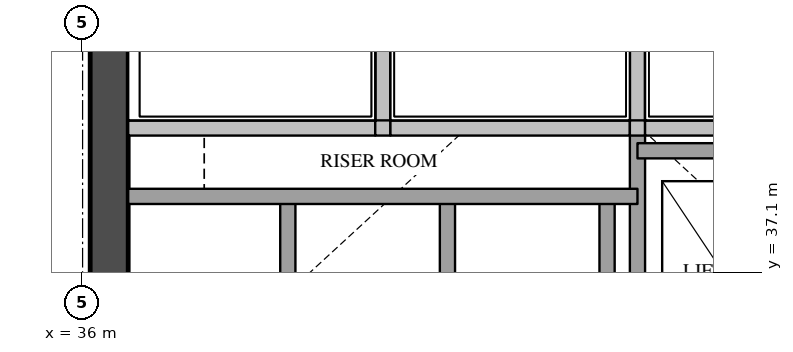
"""IFC4 building model, lengths in metres.
Left out: names, types, materials, properties, quantities, classifications, styles, units other than length and angle.
Written with IfcOpenShell. Run it as: python <this file> out.ifc"""

import sys

from ifc_helpers import new_model, si_unit, direction, frame, frame_2d, origin, place, context, subcontext, project, spatial, rectangle, extrude, element, save


model = new_model("IFC4")
c1 = context("Model", 3, precision=1e-05, world=origin(), true_north=direction((0.0, 1.0)))
c2 = subcontext(c1, "Body", "Model", "MODEL_VIEW")
j1 = project(units=[si_unit("LENGTHUNIT", "METRE"), si_unit("PLANEANGLEUNIT", "RADIAN")], contexts=[c1])
p1 = place(None, origin())
s1 = spatial("IfcSite", under=j1, at=p1, CompositionType="ELEMENT")
p2 = place(p1, origin())
s2 = spatial("IfcBuilding", under=s1, at=p2, CompositionType="ELEMENT")
p3 = place(p2, frame((0.0, 0.0, 197.3)))
s3 = spatial("IfcBuildingStorey", under=s2, at=p3, CompositionType="ELEMENT", Elevation=197.3)
p4 = place(p3, frame((36.35, 29.1, 0.0), z_axis=(0.0, 0.0, 1.0), x_axis=(0.0, 1.0, 0.0)))
e1 = element("IfcWall", 1, at=p4, inside=s3, PredefinedType="SHEAR", context=c2, shape_type="SweptSolid", body=[
    extrude(rectangle(XDim=20.3, YDim=0.5, at=frame_2d((10.15, 0.0))), origin(), (0.0, 0.0, 1.0), 5.7),
])
p5 = place(p4, frame((3.6, 0.0, 0.0)))
e2 = element("IfcOpeningElement", 2, at=p5, cuts=e1, PredefinedType="OPENING", context=c2, shape_type="SweptSolid", body=[
    extrude(rectangle(XDim=1.8, YDim=2.1, at=frame_2d((0.9, 1.05))), frame((0.0, 0.26, 0.0), z_axis=(0.0, -1.0, 0.0), x_axis=(1.0, 0.0, 0.0)), (0.0, 0.0, 1.0), 0.52),
])
p6 = place(p4, frame((16.4, 0.0, 0.0)))
e3 = element("IfcOpeningElement", 3, at=p6, cuts=e1, PredefinedType="OPENING", context=c2, shape_type="SweptSolid", body=[
    extrude(rectangle(XDim=1.0, YDim=2.1, at=frame_2d((0.5, 1.05))), frame((0.0, 0.26, 0.0), z_axis=(0.0, -1.0, 0.0), x_axis=(1.0, 0.0, 0.0)), (0.0, 0.0, 1.0), 0.52),
])
p7 = place(p3, frame((38.7, 34.9, 0.0), z_axis=(0.0, 0.0, 1.0), x_axis=(0.0, 1.0, 0.0)))
e4 = element("IfcWall", 4, at=p7, inside=s3, PredefinedType="SOLIDWALL", context=c2, shape_type="SweptSolid", body=[
    extrude(rectangle(XDim=3.2, YDim=0.2, at=frame_2d((1.6, 0.0))), origin(), (0.0, 0.0, 1.0), 5.7),
])
p8 = place(p3, frame((39.95, 39.0, 0.0), z_axis=(0.0, 0.0, 1.0), x_axis=(0.0, 1.0, 0.0)))
e5 = element("IfcWall", 5, at=p8, inside=s3, PredefinedType="SOLIDWALL", context=c2, shape_type="SweptSolid", body=[
    extrude(rectangle(XDim=2.02, YDim=0.2, at=frame_2d((1.01, 0.0))), origin(), (0.0, 0.0, 1.0), 5.7),
])
for number, where, z_axis, x_axis in (
    (6, (40.8, 34.9, 0.0), (0.0, 0.0, 1.0), (0.0, 1.0, 0.0)),
    (7, (42.9, 34.9, 0.0), (0.0, 0.0, 1.0), (0.0, 1.0, 0.0)),
):
    element("IfcWall", number, at=place(p3, frame(where, z_axis=z_axis, x_axis=x_axis)), inside=s3, PredefinedType="SOLIDWALL", context=c2, shape_type="SweptSolid", body=[
        extrude(rectangle(XDim=3.2, YDim=0.2, at=frame_2d((1.6, 0.0))), origin(), (0.0, 0.0, 1.0), 5.7),
    ])
p9 = place(p3, frame((43.3, 29.1, 0.0), z_axis=(0.0, 0.0, 1.0), x_axis=(0.0, 1.0, 0.0)))
e8 = element("IfcWall", 8, at=p9, inside=s3, PredefinedType="SOLIDWALL", context=c2, shape_type="SweptSolid", body=[
    extrude(rectangle(XDim=9.9, YDim=0.2, at=frame_2d((4.95, 0.0))), origin(), (0.0, 0.0, 1.0), 5.7),
])
p10 = place(p9, frame((3.6, 0.0, 0.0)))
e9 = element("IfcOpeningElement", 9, at=p10, cuts=e8, PredefinedType="OPENING", context=c2, shape_type="SweptSolid", body=[
    extrude(rectangle(XDim=1.8, YDim=2.1, at=frame_2d((0.9, 1.05))), frame((0.0, 0.11, 0.0), z_axis=(0.0, -1.0, 0.0), x_axis=(1.0, 0.0, 0.0)), (0.0, 0.0, 1.0), 0.22),
])
p11 = place(p3, frame((43.3, 39.0, 0.0), z_axis=(0.0, 0.0, 1.0), x_axis=(0.0, 1.0, 0.0)))
e10 = element("IfcWall", 10, at=p11, inside=s3, PredefinedType="SOLIDWALL", context=c2, shape_type="SweptSolid", body=[
    extrude(rectangle(XDim=2.02, YDim=0.2, at=frame_2d((1.01, 0.0))), origin(), (0.0, 0.0, 1.0), 5.7),
])
p12 = place(p3, frame((36.6, 38.1, 0.0), z_axis=(0.0, 0.0, 1.0), x_axis=(1.0, 0.0, 0.0)))
e11 = element("IfcWall", 11, at=p12, inside=s3, PredefinedType="SOLIDWALL", context=c2, shape_type="SweptSolid", body=[
    extrude(rectangle(XDim=6.7, YDim=0.2, at=frame_2d((3.35, 0.0))), origin(), (0.0, 0.0, 1.0), 5.7),
])
p13 = place(p3, frame((43.3, 38.7, 0.0), z_axis=(0.0, 0.0, 1.0), x_axis=(1.0, 0.0, 0.0)))
e12 = element("IfcWall", 12, at=p13, inside=s3, PredefinedType="SOLIDWALL", context=c2, shape_type="SweptSolid", body=[
    extrude(rectangle(XDim=4.5, YDim=0.2, at=frame_2d((2.25, 0.0))), origin(), (0.0, 0.0, 1.0), 5.7),
])
p14 = place(p3, frame((36.6, 39.0, 0.0), z_axis=(0.0, 0.0, 1.0), x_axis=(1.0, 0.0, 0.0)))
e13 = element("IfcWall", 13, at=p14, inside=s3, PredefinedType="SOLIDWALL", context=c2, shape_type="SweptSolid", body=[
    extrude(rectangle(XDim=3.25, YDim=0.2, at=frame_2d((1.625, 0.0))), origin(), (0.0, 0.0, 1.0), 5.7),
])
p15 = place(p3, frame((39.85, 39.0, 0.0), z_axis=(0.0, 0.0, 1.0), x_axis=(1.0, 0.0, 0.0)))
e14 = element("IfcWall", 14, at=p15, inside=s3, PredefinedType="SOLIDWALL", context=c2, shape_type="SweptSolid", body=[
    extrude(rectangle(XDim=0.2, YDim=0.2, at=frame_2d((0.1, 0.0))), origin(), (0.0, 0.0, 1.0), 5.7),
])
p16 = place(p3, frame((40.05, 39.0, 0.0), z_axis=(0.0, 0.0, 1.0), x_axis=(1.0, 0.0, 0.0)))
e15 = element("IfcWall", 15, at=p16, inside=s3, PredefinedType="SOLIDWALL", context=c2, shape_type="SweptSolid", body=[
    extrude(rectangle(XDim=3.15, YDim=0.2, at=frame_2d((1.575, 0.0))), origin(), (0.0, 0.0, 1.0), 5.7),
])
p17 = place(p3, frame((43.2, 39.0, 0.0), z_axis=(0.0, 0.0, 1.0), x_axis=(1.0, 0.0, 0.0)))
e16 = element("IfcWall", 16, at=p17, inside=s3, PredefinedType="SOLIDWALL", context=c2, shape_type="SweptSolid", body=[
    extrude(rectangle(XDim=0.2, YDim=0.2, at=frame_2d((0.1, 0.0))), origin(), (0.0, 0.0, 1.0), 5.7),
])
p18 = place(p3, frame((43.4, 39.0, 0.0), z_axis=(0.0, 0.0, 1.0), x_axis=(1.0, 0.0, 0.0)))
e17 = element("IfcWall", 17, at=p18, inside=s3, PredefinedType="SOLIDWALL", context=c2, shape_type="SweptSolid", body=[
    extrude(rectangle(XDim=3.25, YDim=0.2, at=frame_2d((1.625, 0.0))), origin(), (0.0, 0.0, 1.0), 5.7),
])
save(model, sys.argv[1])
